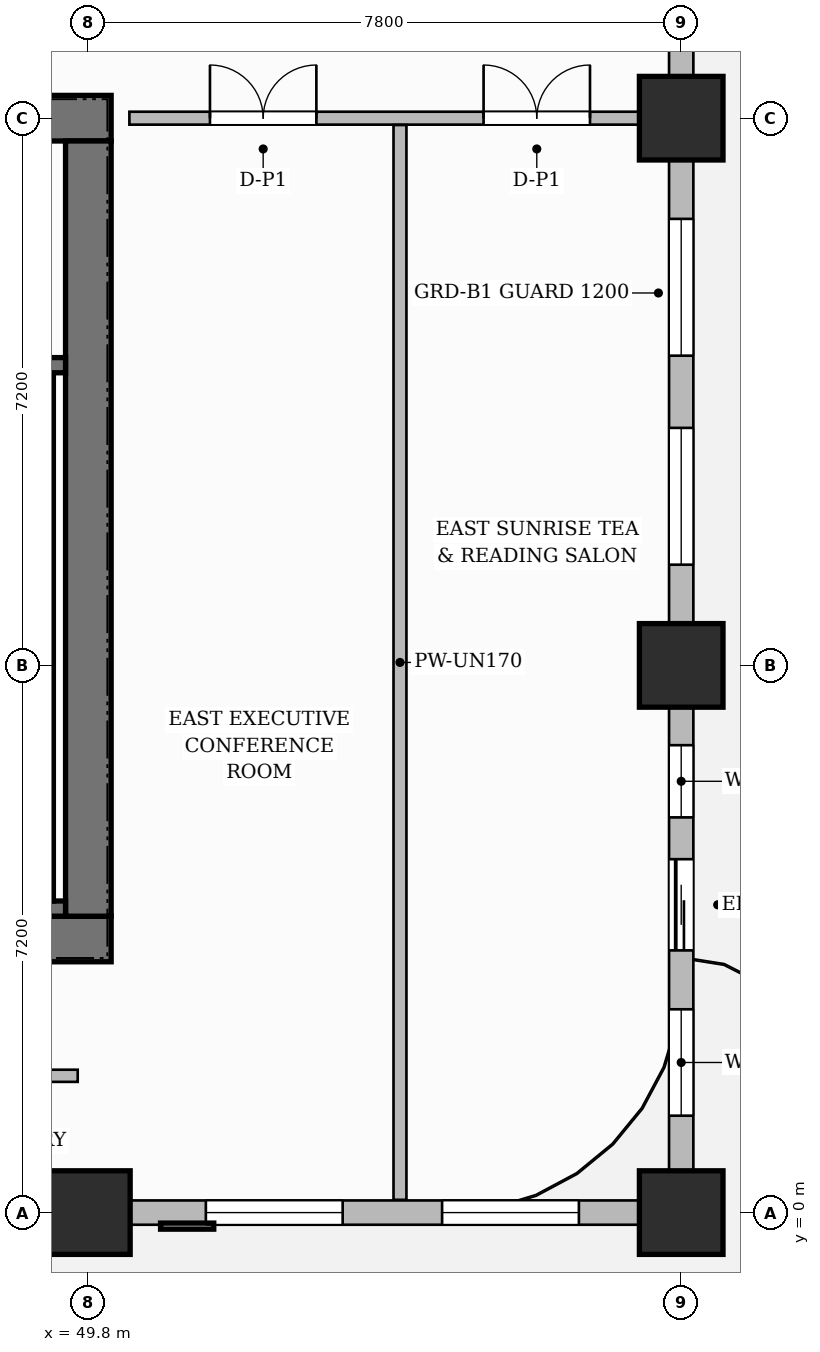
"""IFC4 building model, lengths in metres.
Left out: names, types, materials, properties, quantities, classifications, styles, units other than length and angle.
Written with IfcOpenShell. Run it as: python <this file> out.ifc"""

import sys

from ifc_helpers import new_model, si_unit, direction, frame, frame_2d, origin, origin_2d, place, context, subcontext, project, spatial, rectangle, extrude, source, transform, mapped, element, fill, save


model = new_model("IFC4")
c1 = context("Model", 3, precision=1e-05, world=origin(), true_north=direction((0.0, 1.0)))
c2 = subcontext(c1, "Body", "Model", "MODEL_VIEW")
j1 = project(units=[si_unit("LENGTHUNIT", "METRE"), si_unit("PLANEANGLEUNIT", "RADIAN")], contexts=[c1])
p1 = place(None, origin())
s1 = spatial("IfcSite", under=j1, at=p1, CompositionType="ELEMENT")
p2 = place(p1, origin())
s2 = spatial("IfcBuilding", under=s1, at=p2, CompositionType="ELEMENT")
p3 = place(p2, frame((0.0, 0.0, 47.2)))
s3 = spatial("IfcBuildingStorey", under=s2, at=p3, CompositionType="ELEMENT", Elevation=47.2)
p4 = place(p3, frame((34.5, 3.6, 0.0), z_axis=(0.0, 0.0, 1.0), x_axis=(1.0, 0.0, 0.0)))
e1 = element("IfcWall", 1, at=p4, inside=s3, PredefinedType="SHEAR", context=c2, shape_type="SweptSolid", body=[
    extrude(rectangle(XDim=15.6, YDim=0.6, at=frame_2d((7.8, 0.0))), origin(), (0.0, 0.0, 1.0), 3.7),
])
p5 = place(p4, frame((4.5, 0.0, 0.0)))
e2 = element("IfcOpeningElement", 2, at=p5, cuts=e1, PredefinedType="OPENING", context=c2, shape_type="SweptSolid", body=[
    extrude(rectangle(XDim=0.9, YDim=2.1, at=frame_2d((0.45, 1.05))), frame((0.0, 0.31, 0.0), z_axis=(0.0, -1.0, 0.0), x_axis=(1.0, 0.0, 0.0)), (0.0, 0.0, 1.0), 0.62),
])
p6 = place(p4, frame((6.95, 0.0, 0.0)))
e3 = element("IfcOpeningElement", 3, at=p6, cuts=e1, PredefinedType="OPENING", context=c2, shape_type="SweptSolid", body=[
    extrude(rectangle(XDim=0.9, YDim=2.1, at=frame_2d((0.45, 1.05))), frame((0.0, 0.31, 0.0), z_axis=(0.0, -1.0, 0.0), x_axis=(1.0, 0.0, 0.0)), (0.0, 0.0, 1.0), 0.62),
])
p7 = place(p3, frame((34.5, 14.4, 0.0), z_axis=(0.0, 0.0, 1.0), x_axis=(1.0, 0.0, 0.0)))
e4 = element("IfcWall", 4, at=p7, inside=s3, PredefinedType="SHEAR", context=c2, shape_type="SweptSolid", body=[
    extrude(rectangle(XDim=15.6, YDim=0.6, at=frame_2d((7.8, 0.0))), origin(), (0.0, 0.0, 1.0), 3.7),
])
p8 = place(p7, frame((5.43, 0.0, 0.0)))
e5 = element("IfcOpeningElement", 5, at=p8, cuts=e4, PredefinedType="OPENING", context=c2, shape_type="SweptSolid", body=[
    extrude(rectangle(XDim=1.5, YDim=2.2, at=frame_2d((0.75, 1.1))), frame((0.0, 0.31, 0.0), z_axis=(0.0, -1.0, 0.0), x_axis=(1.0, 0.0, 0.0)), (0.0, 0.0, 1.0), 0.62),
])
p9 = place(p7, frame((1.645, 0.0, 0.0)))
e6 = element("IfcOpeningElement", 6, at=p9, cuts=e4, PredefinedType="OPENING", context=c2, shape_type="SweptSolid", body=[
    extrude(rectangle(XDim=1.05, YDim=2.15, at=frame_2d((0.525, 1.075))), frame((0.0, 0.31, 0.0), z_axis=(0.0, -1.0, 0.0), x_axis=(1.0, 0.0, 0.0)), (0.0, 0.0, 1.0), 0.62),
])
p10 = place(p7, frame((11.275, 0.0, 0.0)))
e7 = element("IfcOpeningElement", 7, at=p10, cuts=e4, PredefinedType="OPENING", context=c2, shape_type="SweptSolid", body=[
    extrude(rectangle(XDim=1.05, YDim=2.15, at=frame_2d((0.525, 1.075))), frame((0.0, 0.31, 0.0), z_axis=(0.0, -1.0, 0.0), x_axis=(1.0, 0.0, 0.0)), (0.0, 0.0, 1.0), 0.62),
])
p11 = place(p3, frame((49.8, 3.9, 0.0), z_axis=(0.0, 0.0, 1.0), x_axis=(0.0, 1.0, 0.0)))
e8 = element("IfcWall", 8, at=p11, inside=s3, PredefinedType="SHEAR", context=c2, shape_type="SweptSolid", body=[
    extrude(rectangle(XDim=10.2, YDim=0.6, at=frame_2d((5.1, 0.0))), origin(), (0.0, 0.0, 1.0), 3.7),
])
m1 = source(origin(), c2, "Body", "SweptSolid", [
    extrude(rectangle(XDim=1.1, YDim=1.1, at=origin_2d()), origin(), (0.0, 0.0, 1.0), 3.7),
])
for number, where, z_axis, x_axis in (
    (9, (49.8, 0.0, 0.0), (0.0, 0.0, 1.0), (1.0, 0.0, 0.0)),
    (10, (57.6, 0.0, 0.0), (0.0, 0.0, 1.0), (1.0, 0.0, 0.0)),
    (11, (57.6, 7.2, 0.0), (0.0, 0.0, 1.0), (1.0, 0.0, 0.0)),
    (12, (57.6, 14.4, 0.0), (0.0, 0.0, 1.0), (1.0, 0.0, 0.0)),
):
    element("IfcColumn", number, at=place(p3, frame(where, z_axis=z_axis, x_axis=x_axis)), inside=s3, PredefinedType="COLUMN", context=c2, shape_type="MappedRepresentation", body=[
        mapped(m1, transform((0.0, 0.0, 0.0), scale=1.0)),
    ])
p12 = place(p3, frame((43.12, 4.0, 0.0), z_axis=(0.0, 0.0, 1.0), x_axis=(1.0, 0.0, 0.0)))
e13 = element("IfcWall", 13, at=p12, inside=s3, PredefinedType="SHEAR", context=c2, shape_type="SweptSolid", body=[
    extrude(rectangle(XDim=6.38, YDim=0.2, at=frame_2d((3.19, 0.0))), origin(), (0.0, 0.0, 1.0), 3.7),
])
p13 = place(p3, frame((49.24, 4.1, 0.0), z_axis=(0.0, 0.0, 1.0), x_axis=(0.0, 1.0, 0.0)))
e14 = element("IfcWall", 14, at=p13, inside=s3, PredefinedType="SHEAR", context=c2, shape_type="SweptSolid", body=[
    extrude(rectangle(XDim=6.95, YDim=0.2, at=frame_2d((3.475, 0.0))), origin(), (0.0, 0.0, 1.0), 3.7),
])
p14 = place(p3, frame((43.12, 11.15, 0.0), z_axis=(0.0, 0.0, 1.0), x_axis=(1.0, 0.0, 0.0)))
e15 = element("IfcWall", 15, at=p14, inside=s3, PredefinedType="SHEAR", context=c2, shape_type="SweptSolid", body=[
    extrude(rectangle(XDim=6.38, YDim=0.2, at=frame_2d((3.19, 0.0))), origin(), (0.0, 0.0, 1.0), 3.7),
])
p15 = place(p14, frame((1.045, 0.0, 0.0)))
e16 = element("IfcOpeningElement", 16, at=p15, cuts=e15, PredefinedType="OPENING", context=c2, shape_type="SweptSolid", body=[
    extrude(rectangle(XDim=1.05, YDim=2.2, at=frame_2d((0.525, 1.1))), frame((0.0, 0.11, 0.0), z_axis=(0.0, -1.0, 0.0), x_axis=(1.0, 0.0, 0.0)), (0.0, 0.0, 1.0), 0.22),
])
p16 = place(p14, frame((4.125, 0.0, 0.0)))
e17 = element("IfcOpeningElement", 17, at=p16, cuts=e15, PredefinedType="OPENING", context=c2, shape_type="SweptSolid", body=[
    extrude(rectangle(XDim=1.05, YDim=2.2, at=frame_2d((0.525, 1.1))), frame((0.0, 0.11, 0.0), z_axis=(0.0, -1.0, 0.0), x_axis=(1.0, 0.0, 0.0)), (0.0, 0.0, 1.0), 0.22),
])
p17 = place(p3, frame((30.29, 1.8, 0.0), z_axis=(0.0, 0.0, 1.0), x_axis=(1.0, 0.0, 0.0)))
e18 = element("IfcWall", 18, at=p17, inside=s3, PredefinedType="PARTITIONING", context=c2, shape_type="SweptSolid", body=[
    extrude(rectangle(XDim=19.37, YDim=0.16, at=frame_2d((9.685, 0.0))), origin(), (0.0, 0.0, 1.0), 3.45),
])
p18 = place(p17, frame((5.213, 0.0, 0.0)))
e19 = element("IfcOpeningElement", 19, at=p18, cuts=e18, PredefinedType="OPENING", context=c2, shape_type="SweptSolid", body=[
    extrude(rectangle(XDim=0.9, YDim=2.15, at=frame_2d((0.45, 1.075))), frame((0.0, 0.09, 0.0), z_axis=(0.0, -1.0, 0.0), x_axis=(1.0, 0.0, 0.0)), (0.0, 0.0, 1.0), 0.18),
])
p19 = place(p17, frame((14.06, 0.0, 0.0)))
e20 = element("IfcOpeningElement", 20, at=p19, cuts=e18, PredefinedType="OPENING", context=c2, shape_type="SweptSolid", body=[
    extrude(rectangle(XDim=0.9, YDim=2.15, at=frame_2d((0.45, 1.075))), frame((0.0, 0.09, 0.0), z_axis=(0.0, -1.0, 0.0), x_axis=(1.0, 0.0, 0.0)), (0.0, 0.0, 1.0), 0.18),
])
p20 = place(p3, frame((50.34, 14.4, 0.0), z_axis=(0.0, 0.0, 1.0), x_axis=(1.0, 0.0, 0.0)))
e21 = element("IfcWall", 21, at=p20, inside=s3, PredefinedType="PARTITIONING", context=c2, shape_type="SweptSolid", body=[
    extrude(rectangle(XDim=7.07, YDim=0.17, at=frame_2d((3.535, 0.0))), origin(), (0.0, 0.0, 1.0), 2.885),
])
p21 = place(p20, frame((1.06, 0.0, 0.0)))
e22 = element("IfcOpeningElement", 22, at=p21, cuts=e21, PredefinedType="OPENING", context=c2, shape_type="SweptSolid", body=[
    extrude(rectangle(XDim=1.4, YDim=2.35, at=frame_2d((0.7, 1.175))), frame((0.0, 0.095, 0.0), z_axis=(0.0, -1.0, 0.0), x_axis=(1.0, 0.0, 0.0)), (0.0, 0.0, 1.0), 0.19),
])
p22 = place(p20, frame((4.66, 0.0, 0.0)))
e23 = element("IfcOpeningElement", 23, at=p22, cuts=e21, PredefinedType="OPENING", context=c2, shape_type="SweptSolid", body=[
    extrude(rectangle(XDim=1.4, YDim=2.35, at=frame_2d((0.7, 1.175))), frame((0.0, 0.095, 0.0), z_axis=(0.0, -1.0, 0.0), x_axis=(1.0, 0.0, 0.0)), (0.0, 0.0, 1.0), 0.19),
])
p23 = place(p3, frame((53.9, 0.168, 0.0), z_axis=(0.0, 0.0, 1.0), x_axis=(0.0, 1.0, 0.0)))
e24 = element("IfcWall", 24, at=p23, inside=s3, PredefinedType="PARTITIONING", context=c2, shape_type="SweptSolid", body=[
    extrude(rectangle(XDim=14.142, YDim=0.17, at=frame_2d((7.071, 0.0))), origin(), (0.0, 0.0, 1.0), 3.035),
])
p24 = place(p3, frame((14.4, 0.0, 0.0), z_axis=(0.0, 0.0, 1.0), x_axis=(1.0, 0.0, 0.0)))
e25 = element("IfcWall", 25, at=p24, inside=s3, PredefinedType="SOLIDWALL", context=c2, shape_type="SweptSolid", body=[
    extrude(rectangle(XDim=43.2, YDim=0.32, at=frame_2d((21.6, 0.0))), origin(), (0.0, 0.0, 1.0), 2.885),
])
p25 = place(p24, frame((1.5, 0.0, 0.0)))
e26 = element("IfcOpeningElement", 26, at=p25, cuts=e25, PredefinedType="OPENING", context=c2, shape_type="SweptSolid", body=[
    extrude(rectangle(XDim=1.2, YDim=2.2, at=frame_2d((0.6, 1.1))), frame((0.0, 0.17, 0.0), z_axis=(0.0, -1.0, 0.0), x_axis=(1.0, 0.0, 0.0)), (0.0, 0.0, 1.0), 0.34),
])
p26 = place(p24, frame((3.8, 0.0, 0.8)))
e27 = element("IfcOpeningElement", 27, at=p26, cuts=e25, PredefinedType="OPENING", context=c2, shape_type="SweptSolid", body=[
    extrude(rectangle(XDim=1.8, YDim=1.85, at=frame_2d((0.9, 0.925))), frame((0.0, 0.17, 0.0), z_axis=(0.0, -1.0, 0.0), x_axis=(1.0, 0.0, 0.0)), (0.0, 0.0, 1.0), 0.34),
])
p27 = place(p24, frame((8.181, 0.0, 0.8)))
e28 = element("IfcOpeningElement", 28, at=p27, cuts=e25, PredefinedType="OPENING", context=c2, shape_type="SweptSolid", body=[
    extrude(rectangle(XDim=0.95, YDim=1.75, at=frame_2d((0.475, 0.875))), frame((0.0, 0.17, 0.0), z_axis=(0.0, -1.0, 0.0), x_axis=(1.0, 0.0, 0.0)), (0.0, 0.0, 1.0), 0.34),
])
p28 = place(p24, frame((10.564, 0.0, 0.8)))
e29 = element("IfcOpeningElement", 29, at=p28, cuts=e25, PredefinedType="OPENING", context=c2, shape_type="SweptSolid", body=[
    extrude(rectangle(XDim=1.8, YDim=1.85, at=frame_2d((0.9, 0.925))), frame((0.0, 0.17, 0.0), z_axis=(0.0, -1.0, 0.0), x_axis=(1.0, 0.0, 0.0)), (0.0, 0.0, 1.0), 0.34),
])
p29 = place(p24, frame((16.804, 0.0, 0.8)))
e30 = element("IfcOpeningElement", 30, at=p29, cuts=e25, PredefinedType="OPENING", context=c2, shape_type="SweptSolid", body=[
    extrude(rectangle(XDim=1.8, YDim=1.85, at=frame_2d((0.9, 0.925))), frame((0.0, 0.17, 0.0), z_axis=(0.0, -1.0, 0.0), x_axis=(1.0, 0.0, 0.0)), (0.0, 0.0, 1.0), 0.34),
])
p30 = place(p24, frame((22.396, 0.0, 0.8)))
e31 = element("IfcOpeningElement", 31, at=p30, cuts=e25, PredefinedType="OPENING", context=c2, shape_type="SweptSolid", body=[
    extrude(rectangle(XDim=1.8, YDim=1.85, at=frame_2d((0.9, 0.925))), frame((0.0, 0.17, 0.0), z_axis=(0.0, -1.0, 0.0), x_axis=(1.0, 0.0, 0.0)), (0.0, 0.0, 1.0), 0.34),
])
p31 = place(p24, frame((25.629, 0.0, 0.8)))
e32 = element("IfcOpeningElement", 32, at=p31, cuts=e25, PredefinedType="OPENING", context=c2, shape_type="SweptSolid", body=[
    extrude(rectangle(XDim=0.95, YDim=1.75, at=frame_2d((0.475, 0.875))), frame((0.0, 0.17, 0.0), z_axis=(0.0, -1.0, 0.0), x_axis=(1.0, 0.0, 0.0)), (0.0, 0.0, 1.0), 0.34),
])
p32 = place(p24, frame((29.075, 0.0, 0.8)))
e33 = element("IfcOpeningElement", 33, at=p32, cuts=e25, PredefinedType="OPENING", context=c2, shape_type="SweptSolid", body=[
    extrude(rectangle(XDim=1.8, YDim=1.85, at=frame_2d((0.9, 0.925))), frame((0.0, 0.17, 0.0), z_axis=(0.0, -1.0, 0.0), x_axis=(1.0, 0.0, 0.0)), (0.0, 0.0, 1.0), 0.34),
])
p33 = place(p24, frame((32.125, 0.0, 0.8)))
e34 = element("IfcOpeningElement", 34, at=p33, cuts=e25, PredefinedType="OPENING", context=c2, shape_type="SweptSolid", body=[
    extrude(rectangle(XDim=1.8, YDim=1.85, at=frame_2d((0.9, 0.925))), frame((0.0, 0.17, 0.0), z_axis=(0.0, -1.0, 0.0), x_axis=(1.0, 0.0, 0.0)), (0.0, 0.0, 1.0), 0.34),
])
p34 = place(p24, frame((36.946, 0.0, 0.8)))
e35 = element("IfcOpeningElement", 35, at=p34, cuts=e25, PredefinedType="OPENING", context=c2, shape_type="SweptSolid", body=[
    extrude(rectangle(XDim=1.8, YDim=1.85, at=frame_2d((0.9, 0.925))), frame((0.0, 0.17, 0.0), z_axis=(0.0, -1.0, 0.0), x_axis=(1.0, 0.0, 0.0)), (0.0, 0.0, 1.0), 0.34),
])
p35 = place(p24, frame((40.054, 0.0, 0.8)))
e36 = element("IfcOpeningElement", 36, at=p35, cuts=e25, PredefinedType="OPENING", context=c2, shape_type="SweptSolid", body=[
    extrude(rectangle(XDim=1.8, YDim=1.85, at=frame_2d((0.9, 0.925))), frame((0.0, 0.17, 0.0), z_axis=(0.0, -1.0, 0.0), x_axis=(1.0, 0.0, 0.0)), (0.0, 0.0, 1.0), 0.34),
])
p36 = place(p3, frame((57.6, 0.05, 0.0), z_axis=(0.0, 0.0, 1.0), x_axis=(0.0, 1.0, 0.0)))
e37 = element("IfcWall", 37, at=p36, inside=s3, PredefinedType="SOLIDWALL", context=c2, shape_type="SweptSolid", body=[
    extrude(rectangle(XDim=21.5, YDim=0.32, at=frame_2d((10.75, 0.0))), origin(), (0.0, 0.0, 1.0), 2.885),
])
p37 = place(p36, frame((3.4, 0.0, 0.0)))
e38 = element("IfcOpeningElement", 38, at=p37, cuts=e37, PredefinedType="OPENING", context=c2, shape_type="SweptSolid", body=[
    extrude(rectangle(XDim=1.2, YDim=2.2, at=frame_2d((0.6, 1.1))), frame((0.0, 0.17, 0.0), z_axis=(0.0, -1.0, 0.0), x_axis=(1.0, 0.0, 0.0)), (0.0, 0.0, 1.0), 0.34),
])
p38 = place(p36, frame((1.225, 0.0, 0.8)))
e39 = element("IfcOpeningElement", 39, at=p38, cuts=e37, PredefinedType="OPENING", context=c2, shape_type="SweptSolid", body=[
    extrude(rectangle(XDim=1.4, YDim=1.85, at=frame_2d((0.7, 0.925))), frame((0.0, 0.17, 0.0), z_axis=(0.0, -1.0, 0.0), x_axis=(1.0, 0.0, 0.0)), (0.0, 0.0, 1.0), 0.34),
])
p39 = place(p36, frame((5.15, 0.0, 0.8)))
e40 = element("IfcOpeningElement", 40, at=p39, cuts=e37, PredefinedType="OPENING", context=c2, shape_type="SweptSolid", body=[
    extrude(rectangle(XDim=0.95, YDim=1.75, at=frame_2d((0.475, 0.875))), frame((0.0, 0.17, 0.0), z_axis=(0.0, -1.0, 0.0), x_axis=(1.0, 0.0, 0.0)), (0.0, 0.0, 1.0), 0.34),
])
p40 = place(p36, frame((8.475, 0.0, 0.8)))
e41 = element("IfcOpeningElement", 41, at=p40, cuts=e37, PredefinedType="OPENING", context=c2, shape_type="SweptSolid", body=[
    extrude(rectangle(XDim=1.8, YDim=1.85, at=frame_2d((0.9, 0.925))), frame((0.0, 0.17, 0.0), z_axis=(0.0, -1.0, 0.0), x_axis=(1.0, 0.0, 0.0)), (0.0, 0.0, 1.0), 0.34),
])
p41 = place(p36, frame((11.225, 0.0, 0.8)))
e42 = element("IfcOpeningElement", 42, at=p41, cuts=e37, PredefinedType="OPENING", context=c2, shape_type="SweptSolid", body=[
    extrude(rectangle(XDim=1.8, YDim=1.85, at=frame_2d((0.9, 0.925))), frame((0.0, 0.17, 0.0), z_axis=(0.0, -1.0, 0.0), x_axis=(1.0, 0.0, 0.0)), (0.0, 0.0, 1.0), 0.34),
])
p42 = place(p36, frame((15.471, 0.0, 0.8)))
e43 = element("IfcOpeningElement", 43, at=p42, cuts=e37, PredefinedType="OPENING", context=c2, shape_type="SweptSolid", body=[
    extrude(rectangle(XDim=1.15, YDim=1.8, at=frame_2d((0.575, 0.9))), frame((0.0, 0.17, 0.0), z_axis=(0.0, -1.0, 0.0), x_axis=(1.0, 0.0, 0.0)), (0.0, 0.0, 1.0), 0.34),
])
p43 = place(p36, frame((17.954, 0.0, 0.8)))
e44 = element("IfcOpeningElement", 44, at=p43, cuts=e37, PredefinedType="OPENING", context=c2, shape_type="SweptSolid", body=[
    extrude(rectangle(XDim=1.8, YDim=1.85, at=frame_2d((0.9, 0.925))), frame((0.0, 0.17, 0.0), z_axis=(0.0, -1.0, 0.0), x_axis=(1.0, 0.0, 0.0)), (0.0, 0.0, 1.0), 0.34),
])
m2 = source(origin(), c2, "Body", "SweptSolid", [
    extrude(rectangle(XDim=1.4, YDim=2.35, at=frame_2d((0.7, 1.175))), frame((0.0, 0.025, 0.0), z_axis=(0.0, -1.0, 0.0), x_axis=(1.0, 0.0, 0.0)), (0.0, 0.0, 1.0), 0.05),
])
p44 = place(p21, origin())
e45 = element("IfcDoor", 45, at=p44, inside=s3, OperationType="DOUBLE_DOOR_SINGLE_SWING", PredefinedType="DOOR", context=c2, shape_type="MappedRepresentation", body=[
    mapped(m2, transform((0.0, 0.0, 0.0), scale=1.0)),
])
fill(e22, e45)
p45 = place(p22, origin())
e46 = element("IfcDoor", 46, at=p45, inside=s3, OperationType="DOUBLE_DOOR_SINGLE_SWING", PredefinedType="DOOR", context=c2, shape_type="MappedRepresentation", body=[
    mapped(m2, transform((0.0, 0.0, 0.0), scale=1.0)),
])
fill(e23, e46)
m3 = source(origin(), c2, "Body", "SweptSolid", [
    extrude(rectangle(XDim=1.2, YDim=2.2, at=frame_2d((0.6, 1.1))), frame((0.0, 0.025, 0.0), z_axis=(0.0, -1.0, 0.0), x_axis=(1.0, 0.0, 0.0)), (0.0, 0.0, 1.0), 0.05),
])
p46 = place(p37, origin())
e47 = element("IfcDoor", 47, at=p46, inside=s3, OperationType="SLIDING_TO_LEFT", PredefinedType="DOOR", context=c2, shape_type="MappedRepresentation", body=[
    mapped(m3, transform((0.0, 0.0, 0.0), scale=1.0)),
])
fill(e38, e47)
m4 = source(origin(), c2, "Body", "SweptSolid", [
    extrude(rectangle(XDim=1.8, YDim=1.85, at=frame_2d((0.9, 0.925))), frame((0.0, 0.03, 0.0), z_axis=(0.0, -1.0, 0.0), x_axis=(1.0, 0.0, 0.0)), (0.0, 0.0, 1.0), 0.06),
])
p47 = place(p34, origin())
e48 = element("IfcWindow", 48, at=p47, inside=s3, PartitioningType="DOUBLE_PANEL_VERTICAL", PredefinedType="WINDOW", context=c2, shape_type="MappedRepresentation", body=[
    mapped(m4, transform((0.0, 0.0, 0.0), scale=1.0)),
])
fill(e35, e48)
p48 = place(p35, origin())
e49 = element("IfcWindow", 49, at=p48, inside=s3, PartitioningType="DOUBLE_PANEL_VERTICAL", PredefinedType="WINDOW", context=c2, shape_type="MappedRepresentation", body=[
    mapped(m4, transform((0.0, 0.0, 0.0), scale=1.0)),
])
fill(e36, e49)
m5 = source(origin(), c2, "Body", "SweptSolid", [
    extrude(rectangle(XDim=1.4, YDim=1.85, at=frame_2d((0.7, 0.925))), frame((0.0, 0.03, 0.0), z_axis=(0.0, -1.0, 0.0), x_axis=(1.0, 0.0, 0.0)), (0.0, 0.0, 1.0), 0.06),
])
p49 = place(p38, origin())
e50 = element("IfcWindow", 50, at=p49, inside=s3, PartitioningType="SINGLE_PANEL", PredefinedType="WINDOW", context=c2, shape_type="MappedRepresentation", body=[
    mapped(m5, transform((0.0, 0.0, 0.0), scale=1.0)),
])
fill(e39, e50)
m6 = source(origin(), c2, "Body", "SweptSolid", [
    extrude(rectangle(XDim=0.95, YDim=1.75, at=frame_2d((0.475, 0.875))), frame((0.0, 0.03, 0.0), z_axis=(0.0, -1.0, 0.0), x_axis=(1.0, 0.0, 0.0)), (0.0, 0.0, 1.0), 0.06),
])
p50 = place(p39, origin())
e51 = element("IfcWindow", 51, at=p50, inside=s3, PartitioningType="SINGLE_PANEL", PredefinedType="WINDOW", context=c2, shape_type="MappedRepresentation", body=[
    mapped(m6, transform((0.0, 0.0, 0.0), scale=1.0)),
])
fill(e40, e51)
p51 = place(p40, origin())
e52 = element("IfcWindow", 52, at=p51, inside=s3, PartitioningType="DOUBLE_PANEL_VERTICAL", PredefinedType="WINDOW", context=c2, shape_type="MappedRepresentation", body=[
    mapped(m4, transform((0.0, 0.0, 0.0), scale=1.0)),
])
fill(e41, e52)
p52 = place(p41, origin())
e53 = element("IfcWindow", 53, at=p52, inside=s3, PartitioningType="DOUBLE_PANEL_VERTICAL", PredefinedType="WINDOW", context=c2, shape_type="MappedRepresentation", body=[
    mapped(m4, transform((0.0, 0.0, 0.0), scale=1.0)),
])
fill(e42, e53)
save(model, sys.argv[1])
